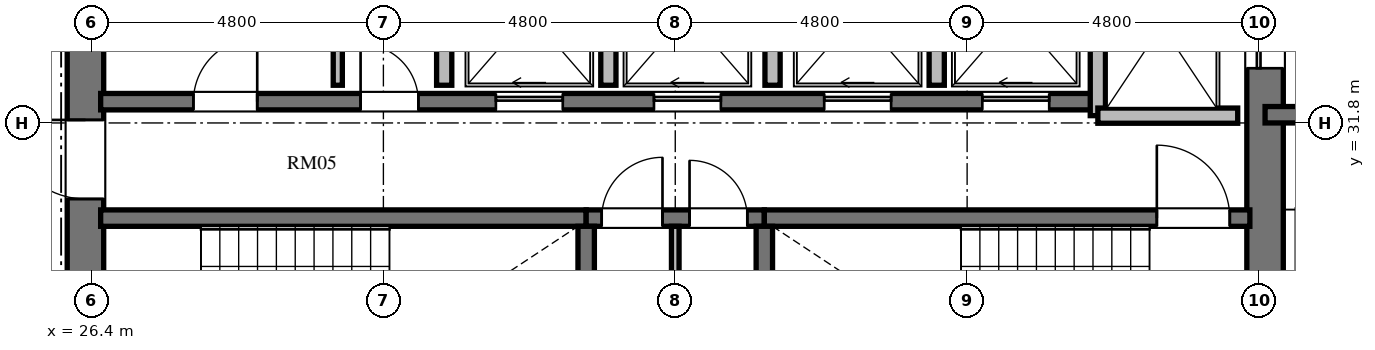
"""IFC4 building model, lengths in metres.
Left out: names, types, materials, properties, quantities, classifications, styles, units other than length and angle.
Written with IfcOpenShell. Run it as: python <this file> out.ifc"""

import sys

from ifc_helpers import new_model, si_unit, direction, frame, frame_2d, origin, place, context, subcontext, project, spatial, rectangle, extrude, element, fill, save


model = new_model("IFC4")
c1 = context("Model", 3, precision=1e-05, world=origin(), true_north=direction((0.0, 1.0)))
c2 = subcontext(c1, "Body", "Model", "MODEL_VIEW")
j1 = project(units=[si_unit("LENGTHUNIT", "METRE"), si_unit("PLANEANGLEUNIT", "RADIAN")], contexts=[c1])
p1 = place(None, origin())
s1 = spatial("IfcSite", under=j1, at=p1, CompositionType="ELEMENT")
p2 = place(p1, origin())
s2 = spatial("IfcBuilding", under=s1, at=p2, CompositionType="ELEMENT")
p3 = place(p2, frame((0.0, 0.0, 141.936)))
s3 = spatial("IfcBuildingStorey", under=s2, at=p3, CompositionType="ELEMENT", Elevation=141.936)
p4 = place(p3, frame((26.3, 20.95, 0.0), z_axis=(0.0, 0.0, 1.0), x_axis=(0.0, 1.0, 0.0)))
e1 = element("IfcWall", 1, at=p4, inside=s3, PredefinedType="SHEAR", context=c2, shape_type="SweptSolid", body=[
    extrude(rectangle(XDim=14.1, YDim=0.6, at=frame_2d((7.05, 0.0))), origin(), (0.0, 0.0, 1.0), 3.648),
])
p5 = place(p4, frame((6.5, 0.0, 0.0)))
e2 = element("IfcOpeningElement", 2, at=p5, cuts=e1, PredefinedType="OPENING", context=c2, shape_type="SweptSolid", body=[
    extrude(rectangle(XDim=1.2, YDim=2.15, at=frame_2d((0.6, 1.075))), frame((0.0, 0.31, 0.0), z_axis=(0.0, -1.0, 0.0), x_axis=(1.0, 0.0, 0.0)), (0.0, 0.0, 1.0), 0.62),
])
p6 = place(p4, frame((9.6, 0.0, 0.0)))
e3 = element("IfcOpeningElement", 3, at=p6, cuts=e1, PredefinedType="OPENING", context=c2, shape_type="SweptSolid", body=[
    extrude(rectangle(XDim=1.3, YDim=2.2, at=frame_2d((0.65, 1.1))), frame((0.0, 0.31, 0.0), z_axis=(0.0, -1.0, 0.0), x_axis=(1.0, 0.0, 0.0)), (0.0, 0.0, 1.0), 0.62),
])
p7 = place(p4, frame((3.26, 0.0, 0.0)))
e4 = element("IfcOpeningElement", 4, at=p7, cuts=e1, PredefinedType="OPENING", context=c2, shape_type="SweptSolid", body=[
    extrude(rectangle(XDim=1.3, YDim=2.2, at=frame_2d((0.65, 1.1))), frame((0.0, 0.31, 0.0), z_axis=(0.0, -1.0, 0.0), x_axis=(1.0, 0.0, 0.0)), (0.0, 0.0, 1.0), 0.62),
])
p8 = place(p3, frame((45.7, 20.95, 0.0), z_axis=(0.0, 0.0, 1.0), x_axis=(0.0, 1.0, 0.0)))
e5 = element("IfcWall", 5, at=p8, inside=s3, PredefinedType="SHEAR", context=c2, shape_type="SweptSolid", body=[
    extrude(rectangle(XDim=14.1, YDim=0.6, at=frame_2d((7.05, 0.0))), origin(), (0.0, 0.0, 1.0), 3.648),
])
p9 = place(p8, frame((11.75, 0.0, 0.0)))
e6 = element("IfcOpeningElement", 6, at=p9, cuts=e5, PredefinedType="OPENING", context=c2, shape_type="SweptSolid", body=[
    extrude(rectangle(XDim=1.4, YDim=2.3, at=frame_2d((0.7, 1.15))), frame((0.0, 0.31, 0.0), z_axis=(0.0, -1.0, 0.0), x_axis=(1.0, 0.0, 0.0)), (0.0, 0.0, 1.0), 0.62),
])
p10 = place(p8, frame((0.95, 0.0, 0.0)))
e7 = element("IfcOpeningElement", 7, at=p10, cuts=e5, PredefinedType="OPENING", context=c2, shape_type="SweptSolid", body=[
    extrude(rectangle(XDim=1.4, YDim=2.3, at=frame_2d((0.7, 1.15))), frame((0.0, 0.31, 0.0), z_axis=(0.0, -1.0, 0.0), x_axis=(1.0, 0.0, 0.0)), (0.0, 0.0, 1.0), 0.62),
])
p11 = place(p3, frame((26.55, 30.235, 0.0), z_axis=(0.0, 0.0, 1.0), x_axis=(1.0, 0.0, 0.0)))
e8 = element("IfcWall", 8, at=p11, inside=s3, PredefinedType="SHEAR", context=c2, shape_type="SweptSolid", body=[
    extrude(rectangle(XDim=7.985, YDim=0.27, at=frame_2d((3.992, 0.0))), origin(), (0.0, 0.0, 1.0), 3.648),
])
p12 = place(p3, frame((34.535, 30.235, 0.0), z_axis=(0.0, 0.0, 1.0), x_axis=(1.0, 0.0, 0.0)))
e9 = element("IfcWall", 9, at=p12, inside=s3, PredefinedType="SHEAR", context=c2, shape_type="SweptSolid", body=[
    extrude(rectangle(XDim=2.93, YDim=0.27, at=frame_2d((1.465, 0.0))), origin(), (0.0, 0.0, 1.0), 3.648),
])
p13 = place(p12, frame((0.255, 0.0, 0.0)))
e10 = element("IfcOpeningElement", 10, at=p13, cuts=e9, PredefinedType="OPENING", context=c2, shape_type="SweptSolid", body=[
    extrude(rectangle(XDim=1.0, YDim=2.1, at=frame_2d((0.5, 1.05))), frame((0.0, 0.145, 0.0), z_axis=(0.0, -1.0, 0.0), x_axis=(1.0, 0.0, 0.0)), (0.0, 0.0, 1.0), 0.29),
])
p14 = place(p12, frame((1.7, 0.0, 0.0)))
e11 = element("IfcOpeningElement", 11, at=p14, cuts=e9, PredefinedType="OPENING", context=c2, shape_type="SweptSolid", body=[
    extrude(rectangle(XDim=0.95, YDim=2.1, at=frame_2d((0.475, 1.05))), frame((0.0, 0.145, 0.0), z_axis=(0.0, -1.0, 0.0), x_axis=(1.0, 0.0, 0.0)), (0.0, 0.0, 1.0), 0.29),
])
p15 = place(p3, frame((37.465, 30.235, 0.0), z_axis=(0.0, 0.0, 1.0), x_axis=(1.0, 0.0, 0.0)))
e12 = element("IfcWall", 12, at=p15, inside=s3, PredefinedType="SHEAR", context=c2, shape_type="SweptSolid", body=[
    extrude(rectangle(XDim=7.985, YDim=0.27, at=frame_2d((3.992, 0.0))), origin(), (0.0, 0.0, 1.0), 3.648),
])
p16 = place(p15, frame((6.455, 0.0, 0.0)))
e13 = element("IfcOpeningElement", 13, at=p16, cuts=e12, PredefinedType="OPENING", context=c2, shape_type="SweptSolid", body=[
    extrude(rectangle(XDim=1.2, YDim=2.15, at=frame_2d((0.6, 1.075))), frame((0.0, 0.145, 0.0), z_axis=(0.0, -1.0, 0.0), x_axis=(1.0, 0.0, 0.0)), (0.0, 0.0, 1.0), 0.29),
])
for number, where, z_axis, x_axis in (
    (14, (34.535, 26.02, 0.0), (0.0, 0.0, 1.0), (0.0, 1.0, 0.0)),
    (15, (37.465, 26.02, 0.0), (0.0, 0.0, 1.0), (0.0, 1.0, 0.0)),
):
    element("IfcWall", number, at=place(p3, frame(where, z_axis=z_axis, x_axis=x_axis)), inside=s3, PredefinedType="SHEAR", context=c2, shape_type="SweptSolid", body=[
        extrude(rectangle(XDim=4.08, YDim=0.27, at=frame_2d((2.04, 0.0))), origin(), (0.0, 0.0, 1.0), 3.648),
    ])
p17 = place(p3, frame((36.0, 26.02, 0.0), z_axis=(0.0, 0.0, 1.0), x_axis=(0.0, 1.0, 0.0)))
e16 = element("IfcWall", 16, at=p17, inside=s3, PredefinedType="PARTITIONING", context=c2, shape_type="SweptSolid", body=[
    extrude(rectangle(XDim=4.08, YDim=0.125, at=frame_2d((2.04, 0.0))), origin(), (0.0, 0.0, 1.0), 3.428),
])
p18 = place(p3, frame((26.55, 32.15, 0.0), z_axis=(0.0, 0.0, 1.0), x_axis=(1.0, 0.0, 0.0)))
e17 = element("IfcWall", 17, at=p18, inside=s3, PredefinedType="SHEAR", context=c2, shape_type="SweptSolid", body=[
    extrude(rectangle(XDim=16.4, YDim=0.27, at=frame_2d((8.2, 0.0))), origin(), (0.0, 0.0, 1.0), 3.648),
])
p19 = place(p18, frame((1.525, 0.0, 0.0)))
e18 = element("IfcOpeningElement", 18, at=p19, cuts=e17, PredefinedType="OPENING", context=c2, shape_type="SweptSolid", body=[
    extrude(rectangle(XDim=1.05, YDim=2.15, at=frame_2d((0.525, 1.075))), frame((0.0, 0.145, 0.0), z_axis=(0.0, -1.0, 0.0), x_axis=(1.0, 0.0, 0.0)), (0.0, 0.0, 1.0), 0.29),
])
p20 = place(p18, frame((4.275, 0.0, 0.0)))
e19 = element("IfcOpeningElement", 19, at=p20, cuts=e17, PredefinedType="OPENING", context=c2, shape_type="SweptSolid", body=[
    extrude(rectangle(XDim=0.95, YDim=2.1, at=frame_2d((0.475, 1.05))), frame((0.0, 0.145, 0.0), z_axis=(0.0, -1.0, 0.0), x_axis=(1.0, 0.0, 0.0)), (0.0, 0.0, 1.0), 0.29),
])
p21 = place(p18, frame((6.5, 0.0, 0.0)))
e20 = element("IfcOpeningElement", 20, at=p21, cuts=e17, PredefinedType="OPENING", context=c2, shape_type="SweptSolid", body=[
    extrude(rectangle(XDim=1.1, YDim=2.2, at=frame_2d((0.55, 1.1))), frame((0.0, 0.145, 0.0), z_axis=(0.0, -1.0, 0.0), x_axis=(1.0, 0.0, 0.0)), (0.0, 0.0, 1.0), 0.29),
])
p22 = place(p18, frame((9.1, 0.0, 0.0)))
e21 = element("IfcOpeningElement", 21, at=p22, cuts=e17, PredefinedType="OPENING", context=c2, shape_type="SweptSolid", body=[
    extrude(rectangle(XDim=1.1, YDim=2.2, at=frame_2d((0.55, 1.1))), frame((0.0, 0.145, 0.0), z_axis=(0.0, -1.0, 0.0), x_axis=(1.0, 0.0, 0.0)), (0.0, 0.0, 1.0), 0.29),
])
p23 = place(p18, frame((11.9, 0.0, 0.0)))
e22 = element("IfcOpeningElement", 22, at=p23, cuts=e17, PredefinedType="OPENING", context=c2, shape_type="SweptSolid", body=[
    extrude(rectangle(XDim=1.1, YDim=2.2, at=frame_2d((0.55, 1.1))), frame((0.0, 0.145, 0.0), z_axis=(0.0, -1.0, 0.0), x_axis=(1.0, 0.0, 0.0)), (0.0, 0.0, 1.0), 0.29),
])
p24 = place(p18, frame((14.5, 0.0, 0.0)))
e23 = element("IfcOpeningElement", 23, at=p24, cuts=e17, PredefinedType="OPENING", context=c2, shape_type="SweptSolid", body=[
    extrude(rectangle(XDim=1.1, YDim=2.2, at=frame_2d((0.55, 1.1))), frame((0.0, 0.145, 0.0), z_axis=(0.0, -1.0, 0.0), x_axis=(1.0, 0.0, 0.0)), (0.0, 0.0, 1.0), 0.29),
])
p25 = place(p3, frame((42.95, 31.92, 0.0), z_axis=(0.0, 0.0, 1.0), x_axis=(0.0, 1.0, 0.0)))
e24 = element("IfcWall", 24, at=p25, inside=s3, PredefinedType="SOLIDWALL", context=c2, shape_type="SweptSolid", body=[
    extrude(rectangle(XDim=3.18, YDim=0.25, at=frame_2d((1.59, 0.0))), origin(), (0.0, 0.0, 1.0), 3.428),
])
p26 = place(p3, frame((42.95, 31.92, 0.0), z_axis=(0.0, 0.0, 1.0), x_axis=(1.0, 0.0, 0.0)))
e25 = element("IfcWall", 25, at=p26, inside=s3, PredefinedType="SOLIDWALL", context=c2, shape_type="SweptSolid", body=[
    extrude(rectangle(XDim=2.3, YDim=0.25, at=frame_2d((1.15, 0.0))), origin(), (0.0, 0.0, 1.0), 3.428),
])
for number, where, z_axis, x_axis in (
    (26, (32.2, 32.42, 0.0), (0.0, 0.0, 1.0), (0.0, 1.0, 0.0)),
    (27, (34.9, 32.42, 0.0), (0.0, 0.0, 1.0), (0.0, 1.0, 0.0)),
    (28, (37.6, 32.42, 0.0), (0.0, 0.0, 1.0), (0.0, 1.0, 0.0)),
    (29, (40.3, 32.42, 0.0), (0.0, 0.0, 1.0), (0.0, 1.0, 0.0)),
):
    element("IfcWall", number, at=place(p3, frame(where, z_axis=z_axis, x_axis=x_axis)), inside=s3, PredefinedType="SOLIDWALL", context=c2, shape_type="SweptSolid", body=[
        extrude(rectangle(XDim=2.68, YDim=0.25, at=frame_2d((1.34, 0.0))), origin(), (0.0, 0.0, 1.0), 3.428),
    ])
p27 = place(p3, frame((30.45, 32.42, 0.0), z_axis=(0.0, 0.0, 1.0), x_axis=(0.0, 1.0, 0.0)))
e30 = element("IfcWall", 30, at=p27, inside=s3, PredefinedType="PARTITIONING", context=c2, shape_type="SweptSolid", body=[
    extrude(rectangle(XDim=2.68, YDim=0.15, at=frame_2d((1.34, 0.0))), origin(), (0.0, 0.0, 1.0), 3.428),
])
p28 = place(p3, frame((45.7, 31.935, 0.0), z_axis=(0.0, 0.0, 1.0), x_axis=(1.0, 0.0, 0.0)))
e31 = element("IfcWall", 31, at=p28, inside=s3, PredefinedType="SHEAR", context=c2, shape_type="SweptSolid", body=[
    extrude(rectangle(XDim=4.715, YDim=0.27, at=frame_2d((2.357, 0.0))), origin(), (0.0, 0.0, 1.0), 3.648),
])
p29 = place(p16, origin())
e32 = element("IfcDoor", 32, at=p29, inside=s3, OperationType="SINGLE_SWING_LEFT", PredefinedType="DOOR", context=c2, shape_type="SweptSolid", body=[
    extrude(rectangle(XDim=1.2, YDim=2.15, at=frame_2d((0.6, 1.075))), frame((0.0, 0.025, 0.0), z_axis=(0.0, -1.0, 0.0), x_axis=(1.0, 0.0, 0.0)), (0.0, 0.0, 1.0), 0.05),
])
fill(e13, e32)
p30 = place(p13, origin())
e33 = element("IfcDoor", 33, at=p30, inside=s3, OperationType="SINGLE_SWING_RIGHT", PredefinedType="DOOR", context=c2, shape_type="SweptSolid", body=[
    extrude(rectangle(XDim=1.0, YDim=2.1, at=frame_2d((0.5, 1.05))), frame((0.0, 0.025, 0.0), z_axis=(0.0, -1.0, 0.0), x_axis=(1.0, 0.0, 0.0)), (0.0, 0.0, 1.0), 0.05),
])
fill(e10, e33)
p31 = place(p14, origin())
e34 = element("IfcDoor", 34, at=p31, inside=s3, OperationType="SINGLE_SWING_LEFT", PredefinedType="DOOR", context=c2, shape_type="SweptSolid", body=[
    extrude(rectangle(XDim=0.95, YDim=2.1, at=frame_2d((0.475, 1.05))), frame((0.0, 0.025, 0.0), z_axis=(0.0, -1.0, 0.0), x_axis=(1.0, 0.0, 0.0)), (0.0, 0.0, 1.0), 0.05),
])
fill(e11, e34)
p32 = place(p6, origin())
e35 = element("IfcDoor", 35, at=p32, inside=s3, OperationType="SINGLE_SWING_RIGHT", PredefinedType="DOOR", context=c2, shape_type="SweptSolid", body=[
    extrude(rectangle(XDim=1.3, YDim=2.2, at=frame_2d((0.65, 1.1))), frame((0.0, 0.025, 0.0), z_axis=(0.0, -1.0, 0.0), x_axis=(1.0, 0.0, 0.0)), (0.0, 0.0, 1.0), 0.05),
])
fill(e3, e35)
p33 = place(p19, origin())
e36 = element("IfcDoor", 36, at=p33, inside=s3, OperationType="SINGLE_SWING_RIGHT", PredefinedType="DOOR", context=c2, shape_type="SweptSolid", body=[
    extrude(rectangle(XDim=1.05, YDim=2.15, at=frame_2d((0.525, 1.075))), frame((0.0, 0.025, 0.0), z_axis=(0.0, -1.0, 0.0), x_axis=(1.0, 0.0, 0.0)), (0.0, 0.0, 1.0), 0.05),
])
fill(e18, e36)
p34 = place(p20, origin())
e37 = element("IfcDoor", 37, at=p34, inside=s3, OperationType="SINGLE_SWING_LEFT", PredefinedType="DOOR", context=c2, shape_type="SweptSolid", body=[
    extrude(rectangle(XDim=0.95, YDim=2.1, at=frame_2d((0.475, 1.05))), frame((0.0, 0.025, 0.0), z_axis=(0.0, -1.0, 0.0), x_axis=(1.0, 0.0, 0.0)), (0.0, 0.0, 1.0), 0.05),
])
fill(e19, e37)
p35 = place(p21, origin())
e38 = element("IfcDoor", 38, at=p35, inside=s3, OperationType="SLIDING_TO_LEFT", PredefinedType="DOOR", context=c2, shape_type="SweptSolid", body=[
    extrude(rectangle(XDim=1.1, YDim=2.2, at=frame_2d((0.55, 1.1))), frame((0.0, 0.025, 0.0), z_axis=(0.0, -1.0, 0.0), x_axis=(1.0, 0.0, 0.0)), (0.0, 0.0, 1.0), 0.05),
])
fill(e20, e38)
p36 = place(p22, origin())
e39 = element("IfcDoor", 39, at=p36, inside=s3, OperationType="SLIDING_TO_LEFT", PredefinedType="DOOR", context=c2, shape_type="SweptSolid", body=[
    extrude(rectangle(XDim=1.1, YDim=2.2, at=frame_2d((0.55, 1.1))), frame((0.0, 0.025, 0.0), z_axis=(0.0, -1.0, 0.0), x_axis=(1.0, 0.0, 0.0)), (0.0, 0.0, 1.0), 0.05),
])
fill(e21, e39)
p37 = place(p23, origin())
e40 = element("IfcDoor", 40, at=p37, inside=s3, OperationType="SLIDING_TO_LEFT", PredefinedType="DOOR", context=c2, shape_type="SweptSolid", body=[
    extrude(rectangle(XDim=1.1, YDim=2.2, at=frame_2d((0.55, 1.1))), frame((0.0, 0.025, 0.0), z_axis=(0.0, -1.0, 0.0), x_axis=(1.0, 0.0, 0.0)), (0.0, 0.0, 1.0), 0.05),
])
fill(e22, e40)
p38 = place(p24, origin())
e41 = element("IfcDoor", 41, at=p38, inside=s3, OperationType="SLIDING_TO_LEFT", PredefinedType="DOOR", context=c2, shape_type="SweptSolid", body=[
    extrude(rectangle(XDim=1.1, YDim=2.2, at=frame_2d((0.55, 1.1))), frame((0.0, 0.025, 0.0), z_axis=(0.0, -1.0, 0.0), x_axis=(1.0, 0.0, 0.0)), (0.0, 0.0, 1.0), 0.05),
])
fill(e23, e41)
p39 = place(p9, origin())
e42 = element("IfcDoor", 42, at=p39, inside=s3, OperationType="SLIDING_TO_LEFT", PredefinedType="DOOR", context=c2, shape_type="SweptSolid", body=[
    extrude(rectangle(XDim=1.4, YDim=2.3, at=frame_2d((0.7, 1.15))), frame((0.0, 0.025, 0.0), z_axis=(0.0, -1.0, 0.0), x_axis=(1.0, 0.0, 0.0)), (0.0, 0.0, 1.0), 0.05),
])
fill(e6, e42)
save(model, sys.argv[1])
